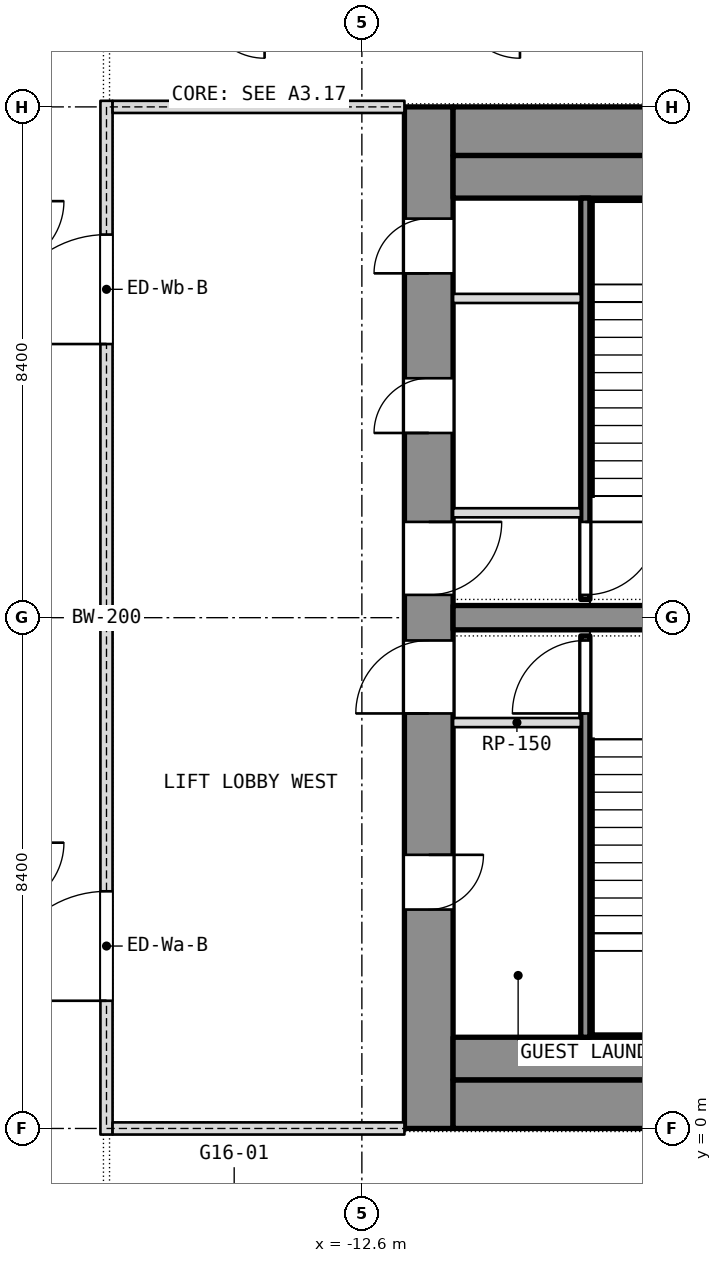
"""IFC4 building model, lengths in metres.
Left out: names, types, materials, properties, quantities, classifications, styles, units other than length and angle.
Written with IfcOpenShell. Run it as: python <this file> out.ifc"""

import sys

from ifc_helpers import new_model, si_unit, direction, frame, frame_2d, origin, place, context, subcontext, project, spatial, rectangle, extrude, element, fill, save


model = new_model("IFC4")
c1 = context("Model", 3, precision=1e-05, world=origin(), true_north=direction((0.0, 1.0)))
c2 = subcontext(c1, "Body", "Model", "MODEL_VIEW")
j1 = project(units=[si_unit("LENGTHUNIT", "METRE"), si_unit("PLANEANGLEUNIT", "RADIAN")], contexts=[c1])
p1 = place(None, origin())
s1 = spatial("IfcSite", under=j1, at=p1, CompositionType="ELEMENT")
p2 = place(p1, origin())
s2 = spatial("IfcBuilding", under=s1, at=p2, CompositionType="ELEMENT")
p3 = place(p2, frame((0.0, 0.0, 202.1)))
s3 = spatial("IfcBuildingStorey", under=s2, at=p3, CompositionType="ELEMENT", Elevation=202.1)
p4 = place(p3, frame((-11.5, 0.0, 0.0), z_axis=(0.0, 0.0, 1.0), x_axis=(0.0, 1.0, 0.0)))
e1 = element("IfcWall", 1, at=p4, inside=s3, PredefinedType="SHEAR", context=c2, shape_type="SweptSolid", body=[
    extrude(rectangle(XDim=16.8, YDim=0.8, at=frame_2d((8.4, 0.0))), origin(), (0.0, 0.0, 1.0), 3.6),
])
p5 = place(p4, frame((3.6, 0.0, 0.0)))
e2 = element("IfcOpeningElement", 2, at=p5, cuts=e1, PredefinedType="OPENING", context=c2, shape_type="SweptSolid", body=[
    extrude(rectangle(XDim=0.9, YDim=2.1, at=frame_2d((0.45, 1.05))), frame((0.0, 0.4, 0.0), z_axis=(0.0, -1.0, 0.0), x_axis=(1.0, 0.0, 0.0)), (0.0, 0.0, 1.0), 0.8),
])
p6 = place(p4, frame((6.825, 0.0, 0.0)))
e3 = element("IfcOpeningElement", 3, at=p6, cuts=e1, PredefinedType="OPENING", context=c2, shape_type="SweptSolid", body=[
    extrude(rectangle(XDim=1.2, YDim=2.1, at=frame_2d((0.6, 1.05))), frame((0.0, 0.4, 0.0), z_axis=(0.0, -1.0, 0.0), x_axis=(1.0, 0.0, 0.0)), (0.0, 0.0, 1.0), 0.8),
])
p7 = place(p4, frame((14.062, 0.0, 0.0)))
e4 = element("IfcOpeningElement", 4, at=p7, cuts=e1, PredefinedType="OPENING", context=c2, shape_type="SweptSolid", body=[
    extrude(rectangle(XDim=0.9, YDim=2.1, at=frame_2d((0.45, 1.05))), frame((0.0, 0.4, 0.0), z_axis=(0.0, -1.0, 0.0), x_axis=(1.0, 0.0, 0.0)), (0.0, 0.0, 1.0), 0.8),
])
p8 = place(p4, frame((11.438, 0.0, 0.0)))
e5 = element("IfcOpeningElement", 5, at=p8, cuts=e1, PredefinedType="OPENING", context=c2, shape_type="SweptSolid", body=[
    extrude(rectangle(XDim=0.9, YDim=2.1, at=frame_2d((0.45, 1.05))), frame((0.0, 0.4, 0.0), z_axis=(0.0, -1.0, 0.0), x_axis=(1.0, 0.0, 0.0)), (0.0, 0.0, 1.0), 0.8),
])
p9 = place(p4, frame((8.775, 0.0, 0.0)))
e6 = element("IfcOpeningElement", 6, at=p9, cuts=e1, PredefinedType="OPENING", context=c2, shape_type="SweptSolid", body=[
    extrude(rectangle(XDim=1.2, YDim=2.1, at=frame_2d((0.6, 1.05))), frame((0.0, 0.4, 0.0), z_axis=(0.0, -1.0, 0.0), x_axis=(1.0, 0.0, 0.0)), (0.0, 0.0, 1.0), 0.8),
])
for number, where, z_axis, x_axis in (
    (7, (-11.1, 0.4, 0.0), (0.0, 0.0, 1.0), (1.0, 0.0, 0.0)),
    (8, (-11.1, 16.4, 0.0), (0.0, 0.0, 1.0), (1.0, 0.0, 0.0)),
):
    element("IfcWall", number, at=place(p3, frame(where, z_axis=z_axis, x_axis=x_axis)), inside=s3, PredefinedType="SHEAR", context=c2, shape_type="SweptSolid", body=[
        extrude(rectangle(XDim=22.2, YDim=0.8, at=frame_2d((11.1, 0.0))), origin(), (0.0, 0.0, 1.0), 3.6),
    ])
p10 = place(p3, frame((-11.1, 8.4, 0.0), z_axis=(0.0, 0.0, 1.0), x_axis=(1.0, 0.0, 0.0)))
e9 = element("IfcWall", 9, at=p10, inside=s3, PredefinedType="SHEAR", context=c2, shape_type="SweptSolid", body=[
    extrude(rectangle(XDim=6.7, YDim=0.4, at=frame_2d((3.35, 0.0))), origin(), (0.0, 0.0, 1.0), 3.6),
])
for number, where, z_axis, x_axis in (
    (10, (-11.1, 1.15, 0.0), (0.0, 0.0, 1.0), (1.0, 0.0, 0.0)),
    (11, (-11.1, 15.65, 0.0), (0.0, 0.0, 1.0), (1.0, 0.0, 0.0)),
):
    element("IfcWall", number, at=place(p3, frame(where, z_axis=z_axis, x_axis=x_axis)), inside=s3, PredefinedType="PARTITIONING", context=c2, shape_type="SweptSolid", body=[
        extrude(rectangle(XDim=22.2, YDim=0.7, at=frame_2d((11.1, 0.0))), origin(), (0.0, 0.0, 1.0), 3.34),
    ])
p11 = place(p3, frame((-8.925, 1.5, 0.0), z_axis=(0.0, 0.0, 1.0), x_axis=(0.0, 1.0, 0.0)))
e12 = element("IfcWall", 12, at=p11, inside=s3, PredefinedType="SHEAR", context=c2, shape_type="SweptSolid", body=[
    extrude(rectangle(XDim=6.6, YDim=0.15, at=frame_2d((3.3, 0.0))), origin(), (0.0, 0.0, 1.0), 3.34),
])
p12 = place(p11, frame((5.325, 0.0, 0.0)))
e13 = element("IfcOpeningElement", 13, at=p12, cuts=e12, PredefinedType="OPENING", context=c2, shape_type="SweptSolid", body=[
    extrude(rectangle(XDim=1.2, YDim=2.1, at=frame_2d((0.6, 1.05))), frame((0.0, 0.075, 0.0), z_axis=(0.0, -1.0, 0.0), x_axis=(1.0, 0.0, 0.0)), (0.0, 0.0, 1.0), 0.15),
])
p13 = place(p3, frame((-11.1, 6.675, 0.0), z_axis=(0.0, 0.0, 1.0), x_axis=(1.0, 0.0, 0.0)))
e14 = element("IfcWall", 14, at=p13, inside=s3, PredefinedType="PARTITIONING", context=c2, shape_type="SweptSolid", body=[
    extrude(rectangle(XDim=2.1, YDim=0.15, at=frame_2d((1.05, 0.0))), origin(), (0.0, 0.0, 1.0), 3.34),
])
p14 = place(p3, frame((-8.925, 8.7, 0.0), z_axis=(0.0, 0.0, 1.0), x_axis=(0.0, 1.0, 0.0)))
e15 = element("IfcWall", 15, at=p14, inside=s3, PredefinedType="SHEAR", context=c2, shape_type="SweptSolid", body=[
    extrude(rectangle(XDim=6.6, YDim=0.15, at=frame_2d((3.3, 0.0))), origin(), (0.0, 0.0, 1.0), 3.34),
])
p15 = place(p14, frame((0.075, 0.0, 0.0)))
e16 = element("IfcOpeningElement", 16, at=p15, cuts=e15, PredefinedType="OPENING", context=c2, shape_type="SweptSolid", body=[
    extrude(rectangle(XDim=1.2, YDim=2.1, at=frame_2d((0.6, 1.05))), frame((0.0, 0.075, 0.0), z_axis=(0.0, -1.0, 0.0), x_axis=(1.0, 0.0, 0.0)), (0.0, 0.0, 1.0), 0.15),
])
for number, where, z_axis, x_axis in (
    (17, (-11.1, 10.125, 0.0), (0.0, 0.0, 1.0), (1.0, 0.0, 0.0)),
    (18, (-11.1, 13.65, 0.0), (0.0, 0.0, 1.0), (1.0, 0.0, 0.0)),
):
    element("IfcWall", number, at=place(p3, frame(where, z_axis=z_axis, x_axis=x_axis)), inside=s3, PredefinedType="PARTITIONING", context=c2, shape_type="SweptSolid", body=[
        extrude(rectangle(XDim=2.1, YDim=0.15, at=frame_2d((1.05, 0.0))), origin(), (0.0, 0.0, 1.0), 3.34),
    ])
p16 = place(p3, frame((-16.8, -0.1, 0.0), z_axis=(0.0, 0.0, 1.0), x_axis=(0.0, 1.0, 0.0)))
e19 = element("IfcWall", 19, at=p16, inside=s3, PredefinedType="PARTITIONING", context=c2, shape_type="SweptSolid", body=[
    extrude(rectangle(XDim=17.0, YDim=0.2, at=frame_2d((8.5, 0.0))), origin(), (0.0, 0.0, 1.0), 3.34),
])
p17 = place(p16, frame((2.2, 0.0, 0.0)))
e20 = element("IfcOpeningElement", 20, at=p17, cuts=e19, PredefinedType="OPENING", context=c2, shape_type="SweptSolid", body=[
    extrude(rectangle(XDim=1.8, YDim=2.1, at=frame_2d((0.9, 1.05))), frame((0.0, 0.1, 0.0), z_axis=(0.0, -1.0, 0.0), x_axis=(1.0, 0.0, 0.0)), (0.0, 0.0, 1.0), 0.2),
])
p18 = place(p16, frame((13.0, 0.0, 0.0)))
e21 = element("IfcOpeningElement", 21, at=p18, cuts=e19, PredefinedType="OPENING", context=c2, shape_type="SweptSolid", body=[
    extrude(rectangle(XDim=1.8, YDim=2.1, at=frame_2d((0.9, 1.05))), frame((0.0, 0.1, 0.0), z_axis=(0.0, -1.0, 0.0), x_axis=(1.0, 0.0, 0.0)), (0.0, 0.0, 1.0), 0.2),
])
for number, where, z_axis, x_axis in (
    (22, (-16.7, 0.0, 0.0), (0.0, 0.0, 1.0), (1.0, 0.0, 0.0)),
    (23, (-16.7, 16.8, 0.0), (0.0, 0.0, 1.0), (1.0, 0.0, 0.0)),
):
    element("IfcWall", number, at=place(p3, frame(where, z_axis=z_axis, x_axis=x_axis)), inside=s3, PredefinedType="PARTITIONING", context=c2, shape_type="SweptSolid", body=[
        extrude(rectangle(XDim=4.8, YDim=0.2, at=frame_2d((2.4, 0.0))), origin(), (0.0, 0.0, 1.0), 2.94),
    ])
p19 = place(p5, origin())
e24 = element("IfcDoor", 24, at=p19, inside=s3, OperationType="SINGLE_SWING_LEFT", PredefinedType="DOOR", context=c2, shape_type="SweptSolid", body=[
    extrude(rectangle(XDim=0.9, YDim=2.1, at=frame_2d((0.45, 1.05))), frame((0.0, 0.025, 0.0), z_axis=(0.0, -1.0, 0.0), x_axis=(1.0, 0.0, 0.0)), (0.0, 0.0, 1.0), 0.05),
])
fill(e2, e24)
p20 = place(p6, origin())
e25 = element("IfcDoor", 25, at=p20, inside=s3, OperationType="SINGLE_SWING_LEFT", PredefinedType="DOOR", context=c2, shape_type="SweptSolid", body=[
    extrude(rectangle(XDim=1.2, YDim=2.1, at=frame_2d((0.6, 1.05))), frame((0.0, 0.025, 0.0), z_axis=(0.0, -1.0, 0.0), x_axis=(1.0, 0.0, 0.0)), (0.0, 0.0, 1.0), 0.05),
])
fill(e3, e25)
p21 = place(p12, origin())
e26 = element("IfcDoor", 26, at=p21, inside=s3, OperationType="SINGLE_SWING_LEFT", PredefinedType="DOOR", context=c2, shape_type="SweptSolid", body=[
    extrude(rectangle(XDim=1.2, YDim=2.1, at=frame_2d((0.6, 1.05))), frame((0.0, 0.025, 0.0), z_axis=(0.0, -1.0, 0.0), x_axis=(1.0, 0.0, 0.0)), (0.0, 0.0, 1.0), 0.05),
])
fill(e13, e26)
p22 = place(p7, origin())
e27 = element("IfcDoor", 27, at=p22, inside=s3, OperationType="SINGLE_SWING_LEFT", PredefinedType="DOOR", context=c2, shape_type="SweptSolid", body=[
    extrude(rectangle(XDim=0.9, YDim=2.1, at=frame_2d((0.45, 1.05))), frame((0.0, 0.025, 0.0), z_axis=(0.0, -1.0, 0.0), x_axis=(1.0, 0.0, 0.0)), (0.0, 0.0, 1.0), 0.05),
])
fill(e4, e27)
p23 = place(p8, origin())
e28 = element("IfcDoor", 28, at=p23, inside=s3, OperationType="SINGLE_SWING_LEFT", PredefinedType="DOOR", context=c2, shape_type="SweptSolid", body=[
    extrude(rectangle(XDim=0.9, YDim=2.1, at=frame_2d((0.45, 1.05))), frame((0.0, 0.025, 0.0), z_axis=(0.0, -1.0, 0.0), x_axis=(1.0, 0.0, 0.0)), (0.0, 0.0, 1.0), 0.05),
])
fill(e5, e28)
p24 = place(p9, origin())
e29 = element("IfcDoor", 29, at=p24, inside=s3, OperationType="SINGLE_SWING_LEFT", PredefinedType="DOOR", context=c2, shape_type="SweptSolid", body=[
    extrude(rectangle(XDim=1.2, YDim=2.1, at=frame_2d((0.6, 1.05))), frame((0.0, 0.025, 0.0), z_axis=(0.0, -1.0, 0.0), x_axis=(1.0, 0.0, 0.0)), (0.0, 0.0, 1.0), 0.05),
])
fill(e6, e29)
p25 = place(p15, origin())
e30 = element("IfcDoor", 30, at=p25, inside=s3, OperationType="SINGLE_SWING_LEFT", PredefinedType="DOOR", context=c2, shape_type="SweptSolid", body=[
    extrude(rectangle(XDim=1.2, YDim=2.1, at=frame_2d((0.6, 1.05))), frame((0.0, 0.025, 0.0), z_axis=(0.0, -1.0, 0.0), x_axis=(1.0, 0.0, 0.0)), (0.0, 0.0, 1.0), 0.05),
])
fill(e16, e30)
p26 = place(p17, origin())
e31 = element("IfcDoor", 31, at=p26, inside=s3, OperationType="DOUBLE_DOOR_SINGLE_SWING", PredefinedType="DOOR", context=c2, shape_type="SweptSolid", body=[
    extrude(rectangle(XDim=1.8, YDim=2.1, at=frame_2d((0.9, 1.05))), frame((0.0, 0.025, 0.0), z_axis=(0.0, -1.0, 0.0), x_axis=(1.0, 0.0, 0.0)), (0.0, 0.0, 1.0), 0.05),
])
fill(e20, e31)
p27 = place(p18, origin())
e32 = element("IfcDoor", 32, at=p27, inside=s3, OperationType="DOUBLE_DOOR_SINGLE_SWING", PredefinedType="DOOR", context=c2, shape_type="SweptSolid", body=[
    extrude(rectangle(XDim=1.8, YDim=2.1, at=frame_2d((0.9, 1.05))), frame((0.0, 0.025, 0.0), z_axis=(0.0, -1.0, 0.0), x_axis=(1.0, 0.0, 0.0)), (0.0, 0.0, 1.0), 0.05),
])
fill(e21, e32)
save(model, sys.argv[1])
